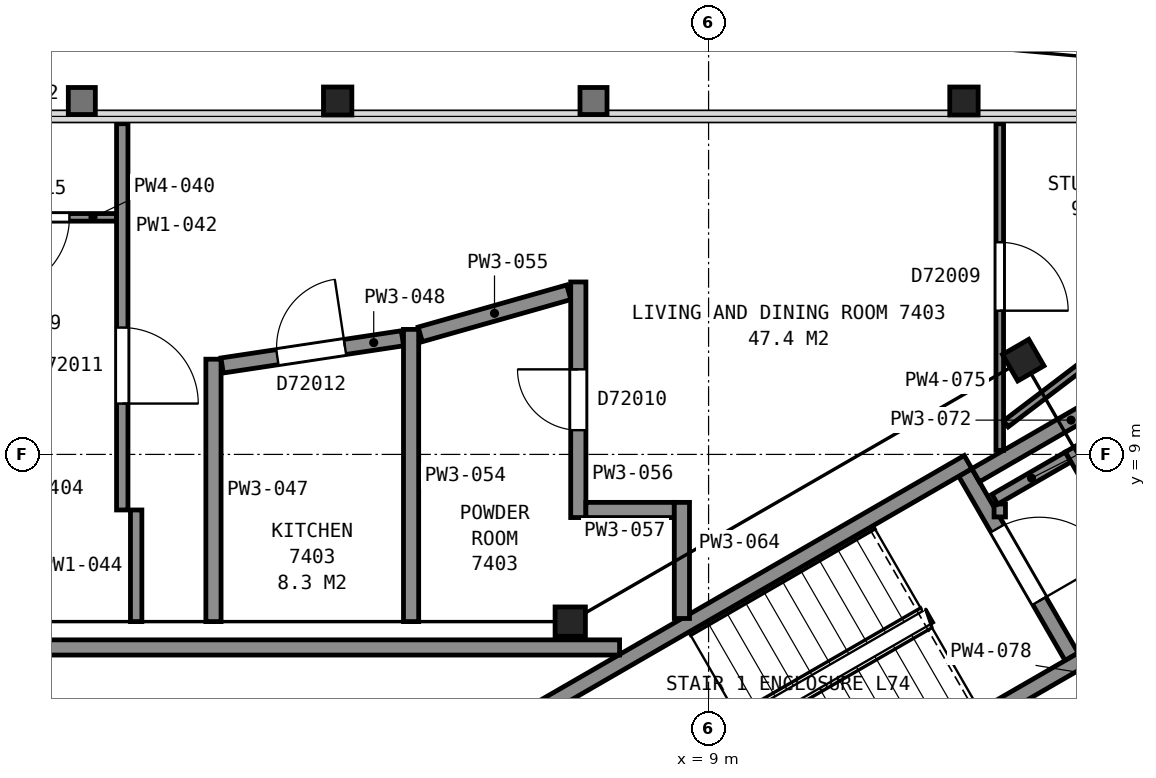
"""IFC4 building model, lengths in metres.
Left out: names, types, materials, properties, quantities, classifications, styles, units other than length and angle.
Written with IfcOpenShell. Run it as: python <this file> out.ifc"""

import sys

from ifc_helpers import new_model, si_unit, direction, frame, frame_2d, origin, origin_2d, place, context, subcontext, project, spatial, rectangle, i_section, extrude, element, fill, save


model = new_model("IFC4")
c1 = context("Model", 3, precision=1e-05, world=origin(), true_north=direction((0.0, 1.0)))
c2 = subcontext(c1, "Body", "Model", "MODEL_VIEW")
j1 = project(units=[si_unit("LENGTHUNIT", "METRE"), si_unit("PLANEANGLEUNIT", "RADIAN")], contexts=[c1])
p1 = place(None, origin())
s1 = spatial("IfcSite", under=j1, at=p1, CompositionType="ELEMENT")
p2 = place(p1, origin())
s2 = spatial("IfcBuilding", under=s1, at=p2, CompositionType="ELEMENT")
p3 = place(p2, frame((0.0, 0.0, 293.6)))
s3 = spatial("IfcBuildingStorey", under=s2, at=p3, CompositionType="ELEMENT", Elevation=293.6)
for number, where, z_axis, x_axis in (
    (1, (12.36, 13.65, 0.0), (0.0, 0.0, 1.0), (1.0, 0.0, 0.0)),
    (2, (4.12, 13.65, 0.0), (0.0, 0.0, 1.0), (1.0, 0.0, 0.0)),
):
    element("IfcColumn", number, at=place(p3, frame(where, z_axis=z_axis, x_axis=x_axis)), inside=s3, PredefinedType="COLUMN", context=c2, shape_type="SweptSolid", body=[
        extrude(i_section(OverallWidth=0.373, OverallDepth=0.368, WebThickness=0.015, FlangeThickness=0.024, FilletRadius=0.015, at=origin_2d()), origin(), (0.0, 0.0, 1.0), 3.7),
    ])
p4 = place(p3, frame((13.14, 10.24, 0.0), z_axis=(0.0, 0.0, 1.0), x_axis=(0.5, -0.866025403784, 0.0)))
e3 = element("IfcColumn", 3, at=p4, inside=s3, PredefinedType="COLUMN", context=c2, shape_type="SweptSolid", body=[
    extrude(i_section(OverallWidth=0.401, OverallDepth=0.399, WebThickness=0.025, FlangeThickness=0.04, FilletRadius=0.015, at=origin_2d()), origin(), (0.0, 0.0, 1.0), 3.7),
])
p5 = place(p3, frame((7.18, 6.8, 0.0), z_axis=(0.0, 0.0, 1.0), x_axis=(1.0, 0.0, 0.0)))
e4 = element("IfcColumn", 4, at=p5, inside=s3, PredefinedType="COLUMN", context=c2, shape_type="SweptSolid", body=[
    extrude(i_section(OverallWidth=0.399, OverallDepth=0.386, WebThickness=0.021, FlangeThickness=0.033, FilletRadius=0.015, at=origin_2d()), origin(), (0.0, 0.0, 1.0), 3.7),
])
p6 = place(p3, frame((13.777, 6.338, 0.0), z_axis=(0.0, 0.0, 1.0), x_axis=(-0.500049511043, 0.865996816683, 0.0)))
e5 = element("IfcWall", 5, at=p6, inside=s3, PredefinedType="PARTITIONING", context=c2, shape_type="SweptSolid", body=[
    extrude(rectangle(XDim=2.8, YDim=0.2, at=frame_2d((1.4, 0.0))), origin(), (0.0, 0.0, 1.0), 3.45),
])
p7 = place(p6, frame((0.85, 0.0, 0.0)))
e6 = element("IfcOpeningElement", 6, at=p7, cuts=e5, PredefinedType="OPENING", context=c2, shape_type="SweptSolid", body=[
    extrude(rectangle(XDim=1.1, YDim=2.1, at=frame_2d((0.55, 1.05))), frame((0.0, 0.11, 0.0), z_axis=(0.0, -1.0, 0.0), x_axis=(1.0, 0.0, 0.0)), (0.0, 0.0, 1.0), 0.22),
])
for number, where, z_axis, x_axis in (
    (7, (6.178, 5.299, 0.0), (0.0, 0.0, 1.0), (0.866, 0.5, 0.0)),
    (8, (7.678, 2.701, 0.0), (0.0, 0.0, 1.0), (0.866, 0.5, 0.0)),
):
    element("IfcWall", number, at=place(p3, frame(where, z_axis=z_axis, x_axis=x_axis)), inside=s3, PredefinedType="PARTITIONING", context=c2, shape_type="SweptSolid", body=[
        extrude(rectangle(XDim=7.2, YDim=0.2, at=frame_2d((3.6, 0.0))), origin(), (0.0, 0.0, 1.0), 3.45),
    ])
p8 = place(p3, frame((7.829, 6.46, 0.0), z_axis=(0.0, 0.0, 1.0), x_axis=(-1.0, 0.0, 0.0)))
e9 = element("IfcWall", 9, at=p8, inside=s3, PredefinedType="PARTITIONING", context=c2, shape_type="SweptSolid", body=[
    extrude(rectangle(XDim=15.658, YDim=0.2, at=frame_2d((7.829, 0.0))), origin(), (0.0, 0.0, 1.0), 3.45),
])
p9 = place(p8, frame((12.168, 0.0, 0.0)))
e10 = element("IfcOpeningElement", 10, at=p9, cuts=e9, PredefinedType="OPENING", context=c2, shape_type="SweptSolid", body=[
    extrude(rectangle(XDim=1.2, YDim=2.1, at=frame_2d((0.6, 1.05))), frame((0.0, 0.11, 0.0), z_axis=(0.0, -1.0, 0.0), x_axis=(1.0, 0.0, 0.0)), (0.0, 0.0, 1.0), 0.22),
])
p10 = place(p3, frame((-1.014, 12.119, 0.0), z_axis=(0.0, 0.0, 1.0), x_axis=(1.0, 0.0, 0.0)))
e11 = element("IfcWall", 11, at=p10, inside=s3, PredefinedType="PARTITIONING", context=c2, shape_type="SweptSolid", body=[
    extrude(rectangle(XDim=2.225, YDim=0.1, at=frame_2d((1.112, 0.0))), origin(), (0.0, 0.0, 1.0), 2.723),
])
p11 = place(p10, frame((0.605, 0.0, 0.0)))
e12 = element("IfcOpeningElement", 12, at=p11, cuts=e11, PredefinedType="OPENING", context=c2, shape_type="SweptSolid", body=[
    extrude(rectangle(XDim=1.0, YDim=2.1, at=frame_2d((0.5, 1.05))), frame((0.0, 0.06, 0.0), z_axis=(0.0, -1.0, 0.0), x_axis=(1.0, 0.0, 0.0)), (0.0, 0.0, 1.0), 0.12),
])
p12 = place(p3, frame((1.286, 13.351, 0.0), z_axis=(0.0, 0.0, 1.0), x_axis=(0.0, -1.0, 0.0)))
e13 = element("IfcWall", 13, at=p12, inside=s3, PredefinedType="PARTITIONING", context=c2, shape_type="SweptSolid", body=[
    extrude(rectangle(XDim=5.082, YDim=0.15, at=frame_2d((2.541, 0.0))), origin(), (0.0, 0.0, 1.0), 2.723),
])
p13 = place(p12, frame((2.682, 0.0, 0.0)))
e14 = element("IfcOpeningElement", 14, at=p13, cuts=e13, PredefinedType="OPENING", context=c2, shape_type="SweptSolid", body=[
    extrude(rectangle(XDim=1.0, YDim=2.1, at=frame_2d((0.5, 1.05))), frame((0.0, 0.085, 0.0), z_axis=(0.0, -1.0, 0.0), x_axis=(1.0, 0.0, 0.0)), (0.0, 0.0, 1.0), 0.17),
])
p14 = place(p3, frame((1.469, 6.8, 0.0), z_axis=(0.0, 0.0, 1.0), x_axis=(0.0, 1.0, 0.0)))
e15 = element("IfcWall", 15, at=p14, inside=s3, PredefinedType="PARTITIONING", context=c2, shape_type="SweptSolid", body=[
    extrude(rectangle(XDim=1.469, YDim=0.15, at=frame_2d((0.734, 0.0))), origin(), (0.0, 0.0, 1.0), 2.723),
])
p15 = place(p3, frame((2.486, 6.8, 0.0), z_axis=(0.0, 0.0, 1.0), x_axis=(0.0, 1.0, 0.0)))
e16 = element("IfcWall", 16, at=p15, inside=s3, PredefinedType="PARTITIONING", context=c2, shape_type="SweptSolid", body=[
    extrude(rectangle(XDim=3.453, YDim=0.2, at=frame_2d((1.727, 0.0))), origin(), (0.0, 0.0, 1.0), 2.723),
])
p16 = place(p3, frame((4.972, 10.528, 0.0), z_axis=(0.0, 0.0, 1.0), x_axis=(-0.988827119235, -0.149066858374, 0.0)))
e17 = element("IfcWall", 17, at=p16, inside=s3, PredefinedType="PARTITIONING", context=c2, shape_type="SweptSolid", body=[
    extrude(rectangle(XDim=2.399, YDim=0.2, at=frame_2d((1.2, 0.0))), origin(), (0.0, 0.0, 1.0), 2.723),
])
p17 = place(p16, frame((0.764, 0.0, 0.0)))
e18 = element("IfcOpeningElement", 18, at=p17, cuts=e17, PredefinedType="OPENING", context=c2, shape_type="SweptSolid", body=[
    extrude(rectangle(XDim=0.9, YDim=2.1, at=frame_2d((0.45, 1.05))), frame((0.0, 0.11, 0.0), z_axis=(0.0, -1.0, 0.0), x_axis=(1.0, 0.0, 0.0)), (0.0, 0.0, 1.0), 0.22),
])
p18 = place(p3, frame((5.086, 6.8, 0.0), z_axis=(0.0, 0.0, 1.0), x_axis=(0.0, 1.0, 0.0)))
e19 = element("IfcWall", 19, at=p18, inside=s3, PredefinedType="PARTITIONING", context=c2, shape_type="SweptSolid", body=[
    extrude(rectangle(XDim=3.845, YDim=0.2, at=frame_2d((1.922, 0.0))), origin(), (0.0, 0.0, 1.0), 2.723),
])
p19 = place(p3, frame((5.206, 10.579, 0.0), z_axis=(0.0, 0.0, 1.0), x_axis=(0.962043687615, 0.272895480212, 0.0)))
e20 = element("IfcWall", 20, at=p19, inside=s3, PredefinedType="PARTITIONING", context=c2, shape_type="SweptSolid", body=[
    extrude(rectangle(XDim=2.032, YDim=0.2, at=frame_2d((1.016, 0.0))), origin(), (0.0, 0.0, 1.0), 2.723),
])
p20 = place(p3, frame((7.286, 8.169, 0.0), z_axis=(0.0, 0.0, 1.0), x_axis=(0.0, 1.0, 0.0)))
e21 = element("IfcWall", 21, at=p20, inside=s3, PredefinedType="PARTITIONING", context=c2, shape_type="SweptSolid", body=[
    extrude(rectangle(XDim=3.1, YDim=0.2, at=frame_2d((1.55, 0.0))), origin(), (0.0, 0.0, 1.0), 2.723),
])
p21 = place(p20, frame((1.15, 0.0, 0.0)))
e22 = element("IfcOpeningElement", 22, at=p21, cuts=e21, PredefinedType="OPENING", context=c2, shape_type="SweptSolid", body=[
    extrude(rectangle(XDim=0.8, YDim=2.1, at=frame_2d((0.4, 1.05))), frame((0.0, 0.11, 0.0), z_axis=(0.0, -1.0, 0.0), x_axis=(1.0, 0.0, 0.0)), (0.0, 0.0, 1.0), 0.22),
])
p22 = place(p3, frame((7.386, 8.269, 0.0), z_axis=(0.0, 0.0, 1.0), x_axis=(1.0, 0.0, 0.0)))
e23 = element("IfcWall", 23, at=p22, inside=s3, PredefinedType="PARTITIONING", context=c2, shape_type="SweptSolid", body=[
    extrude(rectangle(XDim=1.163, YDim=0.2, at=frame_2d((0.582, 0.0))), origin(), (0.0, 0.0, 1.0), 2.723),
])
p23 = place(p3, frame((8.649, 6.841, 0.0), z_axis=(0.0, 0.0, 1.0), x_axis=(0.0, 1.0, 0.0)))
e24 = element("IfcWall", 24, at=p23, inside=s3, PredefinedType="PARTITIONING", context=c2, shape_type="SweptSolid", body=[
    extrude(rectangle(XDim=1.528, YDim=0.2, at=frame_2d((0.764, 0.0))), origin(), (0.0, 0.0, 1.0), 2.723),
])
p24 = place(p3, frame((12.514, 8.726, 0.0), z_axis=(0.0, 0.0, 1.0), x_axis=(0.865969617579, 0.500096612097, 0.0)))
e25 = element("IfcWall", 25, at=p24, inside=s3, PredefinedType="PARTITIONING", context=c2, shape_type="SweptSolid", body=[
    extrude(rectangle(XDim=2.899, YDim=0.2, at=frame_2d((1.45, 0.0))), origin(), (0.0, 0.0, 1.0), 2.723),
])
p25 = place(p3, frame((12.831, 8.177, 0.0), z_axis=(0.0, 0.0, 1.0), x_axis=(0.0, 1.0, 0.0)))
e26 = element("IfcWall", 26, at=p25, inside=s3, PredefinedType="PARTITIONING", context=c2, shape_type="SweptSolid", body=[
    extrude(rectangle(XDim=0.17, YDim=0.15, at=frame_2d((0.085, 0.0))), origin(), (0.0, 0.0, 1.0), 2.723),
])
p26 = place(p3, frame((12.766, 8.409, 0.0), z_axis=(0.0, 0.0, 1.0), x_axis=(0.865995823051, 0.500051231833, 0.0)))
e27 = element("IfcWall", 27, at=p26, inside=s3, PredefinedType="PARTITIONING", context=c2, shape_type="SweptSolid", body=[
    extrude(rectangle(XDim=1.114, YDim=0.15, at=frame_2d((0.557, 0.0))), origin(), (0.0, 0.0, 1.0), 2.723),
])
p27 = place(p3, frame((12.831, 13.351, 0.0), z_axis=(0.0, 0.0, 1.0), x_axis=(0.0, -1.0, 0.0)))
e28 = element("IfcWall", 28, at=p27, inside=s3, PredefinedType="PARTITIONING", context=c2, shape_type="SweptSolid", body=[
    extrude(rectangle(XDim=4.298, YDim=0.1, at=frame_2d((2.149, 0.0))), origin(), (0.0, 0.0, 1.0), 2.723),
])
p28 = place(p27, frame((1.56, 0.0, 0.0)))
e29 = element("IfcOpeningElement", 29, at=p28, cuts=e28, PredefinedType="OPENING", context=c2, shape_type="SweptSolid", body=[
    extrude(rectangle(XDim=0.9, YDim=2.1, at=frame_2d((0.45, 1.05))), frame((0.0, 0.06, 0.0), z_axis=(0.0, -1.0, 0.0), x_axis=(1.0, 0.0, 0.0)), (0.0, 0.0, 1.0), 0.12),
])
p29 = place(p3, frame((18.144, 13.383, 0.0), z_axis=(0.0, 0.0, 1.0), x_axis=(-0.795867985115, -0.605470189414, 0.0)))
e30 = element("IfcWall", 30, at=p29, inside=s3, PredefinedType="PARTITIONING", context=c2, shape_type="SweptSolid", body=[
    extrude(rectangle(XDim=6.574, YDim=0.1, at=frame_2d((3.287, 0.0))), origin(), (0.0, 0.0, 1.0), 2.723),
])
p30 = place(p29, frame((2.925, 0.0, 0.0)))
e31 = element("IfcOpeningElement", 31, at=p30, cuts=e30, PredefinedType="OPENING", context=c2, shape_type="SweptSolid", body=[
    extrude(rectangle(XDim=1.0, YDim=2.1, at=frame_2d((0.5, 1.05))), frame((0.0, 0.06, 0.0), z_axis=(0.0, -1.0, 0.0), x_axis=(1.0, 0.0, 0.0)), (0.0, 0.0, 1.0), 0.12),
])
p31 = place(p3, frame((13.759, 9.069, 0.0), z_axis=(0.0, 0.0, 1.0), x_axis=(0.500020344131, -0.866013657776, 0.0)))
e32 = element("IfcWall", 32, at=p31, inside=s3, PredefinedType="PARTITIONING", context=c2, shape_type="SweptSolid", body=[
    extrude(rectangle(XDim=2.625, YDim=0.15, at=frame_2d((1.312, 0.0))), origin(), (0.0, 0.0, 1.0), 2.723),
])
p32 = place(p7, origin())
e33 = element("IfcDoor", 33, at=p32, inside=s3, OperationType="SINGLE_SWING_LEFT", PredefinedType="DOOR", context=c2, shape_type="SweptSolid", body=[
    extrude(rectangle(XDim=1.1, YDim=2.1, at=frame_2d((0.55, 1.05))), frame((0.0, 0.025, 0.0), z_axis=(0.0, -1.0, 0.0), x_axis=(1.0, 0.0, 0.0)), (0.0, 0.0, 1.0), 0.05),
])
fill(e6, e33)
p33 = place(p11, origin())
e34 = element("IfcDoor", 34, at=p33, inside=s3, OperationType="SINGLE_SWING_LEFT", PredefinedType="DOOR", context=c2, shape_type="SweptSolid", body=[
    extrude(rectangle(XDim=1.0, YDim=2.1, at=frame_2d((0.5, 1.05))), frame((0.0, 0.025, 0.0), z_axis=(0.0, -1.0, 0.0), x_axis=(1.0, 0.0, 0.0)), (0.0, 0.0, 1.0), 0.05),
])
fill(e12, e34)
p34 = place(p13, origin())
e35 = element("IfcDoor", 35, at=p34, inside=s3, OperationType="SINGLE_SWING_RIGHT", PredefinedType="DOOR", context=c2, shape_type="SweptSolid", body=[
    extrude(rectangle(XDim=1.0, YDim=2.1, at=frame_2d((0.5, 1.05))), frame((0.0, 0.025, 0.0), z_axis=(0.0, -1.0, 0.0), x_axis=(1.0, 0.0, 0.0)), (0.0, 0.0, 1.0), 0.05),
])
fill(e14, e35)
p35 = place(p17, origin())
e36 = element("IfcDoor", 36, at=p35, inside=s3, OperationType="SINGLE_SWING_LEFT", PredefinedType="DOOR", context=c2, shape_type="SweptSolid", body=[
    extrude(rectangle(XDim=0.9, YDim=2.1, at=frame_2d((0.45, 1.05))), frame((0.0, 0.025, 0.0), z_axis=(0.0, -1.0, 0.0), x_axis=(1.0, 0.0, 0.0)), (0.0, 0.0, 1.0), 0.05),
])
fill(e18, e36)
p36 = place(p21, origin())
e37 = element("IfcDoor", 37, at=p36, inside=s3, OperationType="SINGLE_SWING_RIGHT", PredefinedType="DOOR", context=c2, shape_type="SweptSolid", body=[
    extrude(rectangle(XDim=0.8, YDim=2.1, at=frame_2d((0.4, 1.05))), frame((0.0, 0.025, 0.0), z_axis=(0.0, -1.0, 0.0), x_axis=(1.0, 0.0, 0.0)), (0.0, 0.0, 1.0), 0.05),
])
fill(e22, e37)
p37 = place(p28, origin())
e38 = element("IfcDoor", 38, at=p37, inside=s3, OperationType="SINGLE_SWING_RIGHT", PredefinedType="DOOR", context=c2, shape_type="SweptSolid", body=[
    extrude(rectangle(XDim=0.9, YDim=2.1, at=frame_2d((0.45, 1.05))), frame((0.0, 0.025, 0.0), z_axis=(0.0, -1.0, 0.0), x_axis=(1.0, 0.0, 0.0)), (0.0, 0.0, 1.0), 0.05),
])
fill(e29, e38)
save(model, sys.argv[1])
